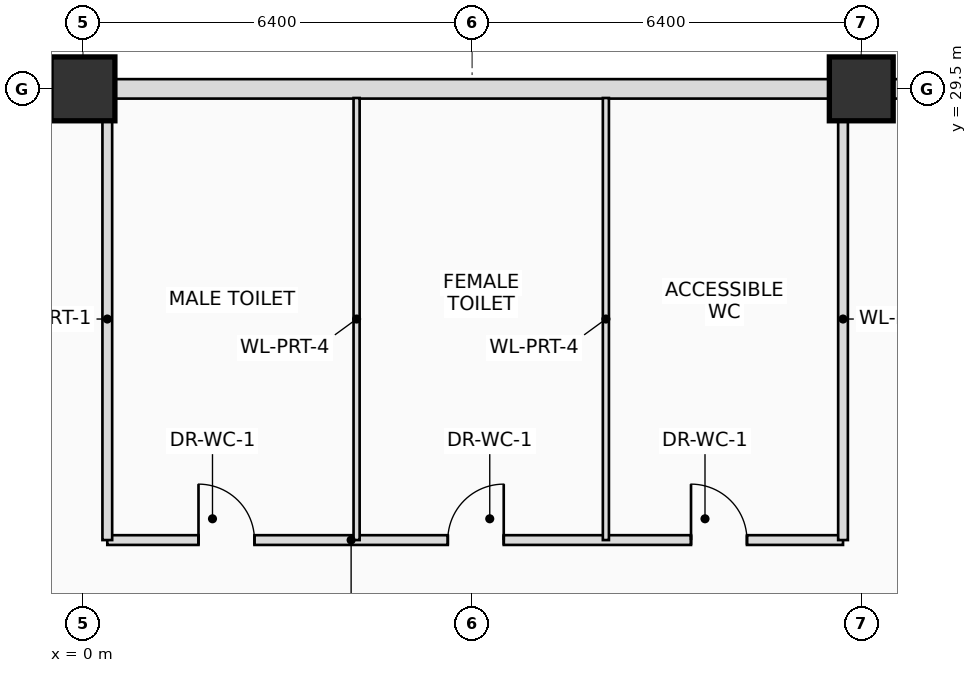
"""IFC4 building model, lengths in metres.
Left out: names, types, materials, properties, quantities, classifications, styles, units other than length and angle.
Written with IfcOpenShell. Run it as: python <this file> out.ifc"""

import sys

from ifc_helpers import new_model, si_unit, direction, frame, frame_2d, origin, origin_2d, place, context, subcontext, project, spatial, rectangle, extrude, source, transform, mapped, element, fill, save


model = new_model("IFC4")
c1 = context("Model", 3, precision=1e-05, world=origin(), true_north=direction((0.0, 1.0)))
c2 = subcontext(c1, "Body", "Model", "MODEL_VIEW")
j1 = project(units=[si_unit("LENGTHUNIT", "METRE"), si_unit("PLANEANGLEUNIT", "RADIAN")], contexts=[c1])
p1 = place(None, origin())
s1 = spatial("IfcSite", under=j1, at=p1, CompositionType="ELEMENT")
p2 = place(p1, origin())
s2 = spatial("IfcBuilding", under=s1, at=p2, CompositionType="ELEMENT")
p3 = place(p2, frame((0.0, 0.0, 4.5)))
s3 = spatial("IfcBuildingStorey", under=s2, at=p3, CompositionType="ELEMENT", Elevation=4.5)
m1 = source(origin(), c2, "Body", "SweptSolid", [
    extrude(rectangle(XDim=1.05, YDim=1.05, at=origin_2d()), origin(), (0.0, 0.0, 1.0), 3.9),
])
for number, where, z_axis, x_axis in (
    (1, (0.0, 29.5, 0.0), (0.0, 0.0, 1.0), (1.0, 0.0, 0.0)),
    (2, (12.8, 29.5, 0.0), (0.0, 0.0, 1.0), (1.0, 0.0, 0.0)),
):
    element("IfcColumn", number, at=place(p3, frame(where, z_axis=z_axis, x_axis=x_axis)), inside=s3, PredefinedType="COLUMN", context=c2, shape_type="MappedRepresentation", body=[
        mapped(m1, transform((0.0, 0.0, 0.0), scale=1.0)),
    ])
p4 = place(p3, frame((-34.0, 29.5, 0.0), z_axis=(0.0, 0.0, 1.0), x_axis=(1.0, 0.0, 0.0)))
e3 = element("IfcWall", 3, at=p4, inside=s3, PredefinedType="SOLIDWALL", context=c2, shape_type="SweptSolid", body=[
    extrude(rectangle(XDim=68.0, YDim=0.32, at=frame_2d((34.0, 0.0))), origin(), (0.0, 0.0, 1.0), 2.65),
])
p5 = place(p4, frame((15.8, 0.0, 0.65)))
e4 = element("IfcOpeningElement", 4, at=p5, cuts=e3, PredefinedType="OPENING", context=c2, shape_type="SweptSolid", body=[
    extrude(rectangle(XDim=1.8, YDim=1.8, at=frame_2d((0.9, 0.9))), frame((0.0, 0.17, 0.0), z_axis=(0.0, -1.0, 0.0), x_axis=(1.0, 0.0, 0.0)), (0.0, 0.0, 1.0), 0.34),
])
p6 = place(p4, frame((49.0, 0.0, 0.65)))
e5 = element("IfcOpeningElement", 5, at=p6, cuts=e3, PredefinedType="OPENING", context=c2, shape_type="SweptSolid", body=[
    extrude(rectangle(XDim=1.8, YDim=1.8, at=frame_2d((0.9, 0.9))), frame((0.0, 0.17, 0.0), z_axis=(0.0, -1.0, 0.0), x_axis=(1.0, 0.0, 0.0)), (0.0, 0.0, 1.0), 0.34),
])
p7 = place(p3, frame((0.4, 22.08, 0.0), z_axis=(0.0, 0.0, 1.0), x_axis=(1.0, 0.0, 0.0)))
e6 = element("IfcWall", 6, at=p7, inside=s3, PredefinedType="PARTITIONING", context=c2, shape_type="SweptSolid", body=[
    extrude(rectangle(XDim=12.1, YDim=0.16, at=frame_2d((6.05, 0.0))), origin(), (0.0, 0.0, 1.0), 3.57),
])
p8 = place(p7, frame((1.5, 0.0, 0.0)))
e7 = element("IfcOpeningElement", 7, at=p8, cuts=e6, PredefinedType="OPENING", context=c2, shape_type="SweptSolid", body=[
    extrude(rectangle(XDim=0.92, YDim=2.1, at=frame_2d((0.46, 1.05))), frame((0.0, 0.09, 0.0), z_axis=(0.0, -1.0, 0.0), x_axis=(1.0, 0.0, 0.0)), (0.0, 0.0, 1.0), 0.18),
])
p9 = place(p7, frame((5.6, 0.0, 0.0)))
e8 = element("IfcOpeningElement", 8, at=p9, cuts=e6, PredefinedType="OPENING", context=c2, shape_type="SweptSolid", body=[
    extrude(rectangle(XDim=0.92, YDim=2.1, at=frame_2d((0.46, 1.05))), frame((0.0, 0.09, 0.0), z_axis=(0.0, -1.0, 0.0), x_axis=(1.0, 0.0, 0.0)), (0.0, 0.0, 1.0), 0.18),
])
p10 = place(p7, frame((9.6, 0.0, 0.0)))
e9 = element("IfcOpeningElement", 9, at=p10, cuts=e6, PredefinedType="OPENING", context=c2, shape_type="SweptSolid", body=[
    extrude(rectangle(XDim=0.92, YDim=2.1, at=frame_2d((0.46, 1.05))), frame((0.0, 0.09, 0.0), z_axis=(0.0, -1.0, 0.0), x_axis=(1.0, 0.0, 0.0)), (0.0, 0.0, 1.0), 0.18),
])
p11 = place(p3, frame((0.4, 22.08, 0.0), z_axis=(0.0, 0.0, 1.0), x_axis=(0.0, 1.0, 0.0)))
e10 = element("IfcWall", 10, at=p11, inside=s3, PredefinedType="PARTITIONING", context=c2, shape_type="SweptSolid", body=[
    extrude(rectangle(XDim=7.27, YDim=0.16, at=frame_2d((3.635, 0.0))), origin(), (0.0, 0.0, 1.0), 3.57),
])
for number, where, z_axis, x_axis in (
    (11, (4.5, 22.08, 0.0), (0.0, 0.0, 1.0), (0.0, 1.0, 0.0)),
    (12, (8.6, 22.08, 0.0), (0.0, 0.0, 1.0), (0.0, 1.0, 0.0)),
):
    element("IfcWall", number, at=place(p3, frame(where, z_axis=z_axis, x_axis=x_axis)), inside=s3, PredefinedType="PARTITIONING", context=c2, shape_type="SweptSolid", body=[
        extrude(rectangle(XDim=7.27, YDim=0.1, at=frame_2d((3.635, 0.0))), origin(), (0.0, 0.0, 1.0), 3.57),
    ])
p12 = place(p3, frame((12.5, 22.08, 0.0), z_axis=(0.0, 0.0, 1.0), x_axis=(0.0, 1.0, 0.0)))
e13 = element("IfcWall", 13, at=p12, inside=s3, PredefinedType="PARTITIONING", context=c2, shape_type="SweptSolid", body=[
    extrude(rectangle(XDim=7.27, YDim=0.16, at=frame_2d((3.635, 0.0))), origin(), (0.0, 0.0, 1.0), 3.57),
])
p13 = place(p8, origin())
e14 = element("IfcDoor", 14, at=p13, inside=s3, OperationType="SINGLE_SWING_LEFT", PredefinedType="DOOR", context=c2, shape_type="SweptSolid", body=[
    extrude(rectangle(XDim=0.92, YDim=2.1, at=frame_2d((0.46, 1.05))), frame((0.0, 0.025, 0.0), z_axis=(0.0, -1.0, 0.0), x_axis=(1.0, 0.0, 0.0)), (0.0, 0.0, 1.0), 0.05),
])
fill(e7, e14)
p14 = place(p9, origin())
e15 = element("IfcDoor", 15, at=p14, inside=s3, OperationType="SINGLE_SWING_RIGHT", PredefinedType="DOOR", context=c2, shape_type="SweptSolid", body=[
    extrude(rectangle(XDim=0.92, YDim=2.1, at=frame_2d((0.46, 1.05))), frame((0.0, 0.025, 0.0), z_axis=(0.0, -1.0, 0.0), x_axis=(1.0, 0.0, 0.0)), (0.0, 0.0, 1.0), 0.05),
])
fill(e8, e15)
p15 = place(p10, origin())
e16 = element("IfcDoor", 16, at=p15, inside=s3, OperationType="SINGLE_SWING_LEFT", PredefinedType="DOOR", context=c2, shape_type="SweptSolid", body=[
    extrude(rectangle(XDim=0.92, YDim=2.1, at=frame_2d((0.46, 1.05))), frame((0.0, 0.025, 0.0), z_axis=(0.0, -1.0, 0.0), x_axis=(1.0, 0.0, 0.0)), (0.0, 0.0, 1.0), 0.05),
])
fill(e9, e16)
save(model, sys.argv[1])
